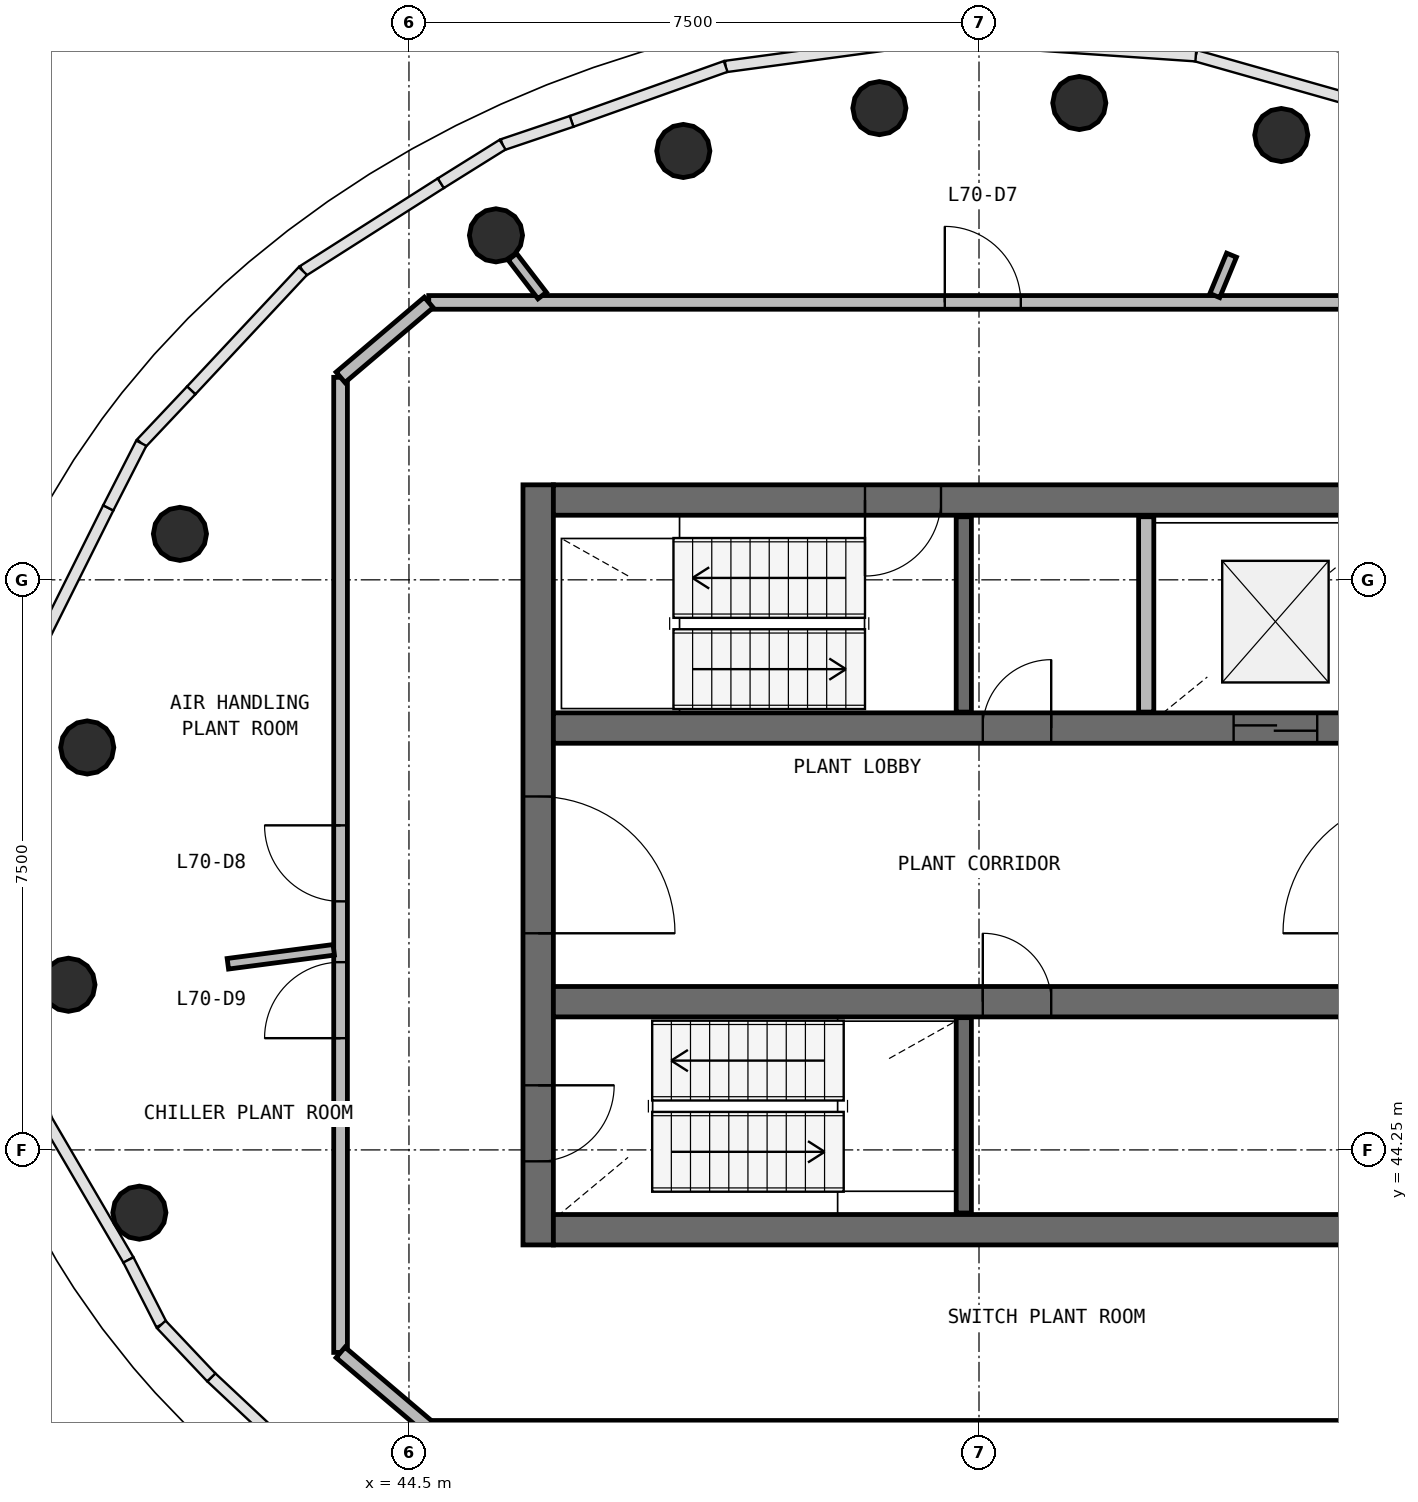
"""IFC4 building model, lengths in metres.
Left out: names, types, materials, properties, quantities, classifications, styles, units other than length and angle.
Written with IfcOpenShell. Run it as: python <this file> out.ifc"""

import sys

from ifc_helpers import new_model, si_unit, direction, frame, frame_2d, origin, origin_2d, place, context, subcontext, project, spatial, rectangle, circle, extrude, source, transform, mapped, element, fill, save


model = new_model("IFC4")
c1 = context("Model", 3, precision=1e-05, world=origin(), true_north=direction((0.0, 1.0)))
c2 = subcontext(c1, "Body", "Model", "MODEL_VIEW")
j1 = project(units=[si_unit("LENGTHUNIT", "METRE"), si_unit("PLANEANGLEUNIT", "RADIAN")], contexts=[c1])
p1 = place(None, origin())
s1 = spatial("IfcSite", under=j1, at=p1, CompositionType="ELEMENT")
p2 = place(p1, origin())
s2 = spatial("IfcBuilding", under=s1, at=p2, CompositionType="ELEMENT")
p3 = place(p2, frame((0.0, 0.0, 283.6)))
s3 = spatial("IfcBuildingStorey", under=s2, at=p3, CompositionType="ELEMENT", Elevation=283.6)
p4 = place(p3, frame((46.2, 53.0, 0.0), z_axis=(0.0, 0.0, 1.0), x_axis=(0.0, -1.0, 0.0)))
e1 = element("IfcWall", 1, at=p4, inside=s3, PredefinedType="SHEAR", context=c2, shape_type="SweptSolid", body=[
    extrude(rectangle(XDim=10.0, YDim=0.4, at=frame_2d((5.0, 0.0))), origin(), (0.0, 0.0, 1.0), 3.5),
])
p5 = place(p4, frame((4.1, 0.0, 0.0)))
e2 = element("IfcOpeningElement", 2, at=p5, cuts=e1, PredefinedType="OPENING", context=c2, shape_type="SweptSolid", body=[
    extrude(rectangle(XDim=1.8, YDim=2.1, at=frame_2d((0.9, 1.05))), frame((0.0, 0.21, 0.0), z_axis=(0.0, -1.0, 0.0), x_axis=(1.0, 0.0, 0.0)), (0.0, 0.0, 1.0), 0.42),
])
p6 = place(p4, frame((7.9, 0.0, 0.0)))
e3 = element("IfcOpeningElement", 3, at=p6, cuts=e1, PredefinedType="OPENING", context=c2, shape_type="SweptSolid", body=[
    extrude(rectangle(XDim=1.0, YDim=2.1, at=frame_2d((0.5, 1.05))), frame((0.0, 0.21, 0.0), z_axis=(0.0, -1.0, 0.0), x_axis=(1.0, 0.0, 0.0)), (0.0, 0.0, 1.0), 0.42),
])
p7 = place(p3, frame((46.4, 43.2, 0.0), z_axis=(0.0, 0.0, 1.0), x_axis=(1.0, 0.0, 0.0)))
e4 = element("IfcWall", 4, at=p7, inside=s3, PredefinedType="SHEAR", context=c2, shape_type="SweptSolid", body=[
    extrude(rectangle(XDim=11.2, YDim=0.4, at=frame_2d((5.6, 0.0))), origin(), (0.0, 0.0, 1.0), 3.5),
])
p8 = place(p3, frame((57.6, 52.8, 0.0), z_axis=(0.0, 0.0, 1.0), x_axis=(-1.0, 0.0, 0.0)))
e5 = element("IfcWall", 5, at=p8, inside=s3, PredefinedType="SHEAR", context=c2, shape_type="SweptSolid", body=[
    extrude(rectangle(XDim=11.2, YDim=0.4, at=frame_2d((5.6, 0.0))), origin(), (0.0, 0.0, 1.0), 3.5),
])
p9 = place(p8, frame((6.1, 0.0, 0.0)))
e6 = element("IfcOpeningElement", 6, at=p9, cuts=e5, PredefinedType="OPENING", context=c2, shape_type="SweptSolid", body=[
    extrude(rectangle(XDim=1.0, YDim=2.1, at=frame_2d((0.5, 1.05))), frame((0.0, 0.21, 0.0), z_axis=(0.0, -1.0, 0.0), x_axis=(1.0, 0.0, 0.0)), (0.0, 0.0, 1.0), 0.42),
])
p10 = place(p3, frame((46.4, 49.8, 0.0), z_axis=(0.0, 0.0, 1.0), x_axis=(1.0, 0.0, 0.0)))
e7 = element("IfcWall", 7, at=p10, inside=s3, PredefinedType="SHEAR", context=c2, shape_type="SweptSolid", body=[
    extrude(rectangle(XDim=11.2, YDim=0.4, at=frame_2d((5.6, 0.0))), origin(), (0.0, 0.0, 1.0), 3.5),
])
p11 = place(p10, frame((8.95, 0.0, 0.0)))
e8 = element("IfcOpeningElement", 8, at=p11, cuts=e7, PredefinedType="OPENING", context=c2, shape_type="SweptSolid", body=[
    extrude(rectangle(XDim=1.1, YDim=2.1, at=frame_2d((0.55, 1.05))), frame((0.0, 0.21, 0.0), z_axis=(0.0, -1.0, 0.0), x_axis=(1.0, 0.0, 0.0)), (0.0, 0.0, 1.0), 0.42),
])
p12 = place(p10, frame((5.65, 0.0, 0.0)))
e9 = element("IfcOpeningElement", 9, at=p12, cuts=e7, PredefinedType="OPENING", context=c2, shape_type="SweptSolid", body=[
    extrude(rectangle(XDim=0.9, YDim=2.1, at=frame_2d((0.45, 1.05))), frame((0.0, 0.21, 0.0), z_axis=(0.0, -1.0, 0.0), x_axis=(1.0, 0.0, 0.0)), (0.0, 0.0, 1.0), 0.42),
])
p13 = place(p3, frame((46.4, 46.2, 0.0), z_axis=(0.0, 0.0, 1.0), x_axis=(1.0, 0.0, 0.0)))
e10 = element("IfcWall", 10, at=p13, inside=s3, PredefinedType="SHEAR", context=c2, shape_type="SweptSolid", body=[
    extrude(rectangle(XDim=11.2, YDim=0.4, at=frame_2d((5.6, 0.0))), origin(), (0.0, 0.0, 1.0), 3.5),
])
p14 = place(p13, frame((5.65, 0.0, 0.0)))
e11 = element("IfcOpeningElement", 11, at=p14, cuts=e10, PredefinedType="OPENING", context=c2, shape_type="SweptSolid", body=[
    extrude(rectangle(XDim=0.9, YDim=2.1, at=frame_2d((0.45, 1.05))), frame((0.0, 0.21, 0.0), z_axis=(0.0, -1.0, 0.0), x_axis=(1.0, 0.0, 0.0)), (0.0, 0.0, 1.0), 0.42),
])
m1 = source(origin(), c2, "Body", "SweptSolid", [
    extrude(circle(Radius=0.35, at=origin_2d()), origin(), (0.0, 0.0, 1.0), 3.833),
])
p15 = place(p3, frame((55.977, 57.602, 0.146), z_axis=(-0.156153714732, -0.376946915782, 0.912977020553), x_axis=(0.923864636245, -0.382719393153, 0.0)))
e12 = element("IfcColumn", 12, at=p15, inside=s3, PredefinedType="COLUMN", context=c2, shape_type="MappedRepresentation", body=[
    mapped(m1, transform((0.0, 0.0, 0.0), scale=1.0)),
])
m2 = source(origin(), c2, "Body", "SweptSolid", [
    extrude(circle(Radius=0.35, at=origin_2d()), origin(), (0.0, 0.0, 1.0), 3.784),
])
p16 = place(p3, frame((53.32, 58.023, 0.136), z_axis=(-0.049674543277, -0.377074942147, 0.924849678464), x_axis=(0.99143407694, -0.130608081992, 0.0)))
e13 = element("IfcColumn", 13, at=p16, inside=s3, PredefinedType="COLUMN", context=c2, shape_type="MappedRepresentation", body=[
    mapped(m2, transform((0.0, 0.0, 0.0), scale=1.0)),
])
m3 = source(origin(), c2, "Body", "SweptSolid", [
    extrude(circle(Radius=0.35, at=origin_2d()), origin(), (0.0, 0.0, 1.0), 3.759),
])
p17 = place(p3, frame((50.689, 57.956, 0.131), z_axis=(0.047669920911, -0.361745857591, 0.931057201871), x_axis=(0.991428831601, 0.13064789271, 0.0)))
e14 = element("IfcColumn", 14, at=p17, inside=s3, PredefinedType="COLUMN", context=c2, shape_type="MappedRepresentation", body=[
    mapped(m3, transform((0.0, 0.0, 0.0), scale=1.0)),
])
m4 = source(origin(), c2, "Body", "SweptSolid", [
    extrude(circle(Radius=0.35, at=origin_2d()), origin(), (0.0, 0.0, 1.0), 3.747),
])
p18 = place(p3, frame((48.11, 57.392, 0.128), z_axis=(0.136577604612, -0.329715018769, 0.934149112464), x_axis=(0.923874408562, 0.38269580244, 0.0)))
e15 = element("IfcColumn", 15, at=p18, inside=s3, PredefinedType="COLUMN", context=c2, shape_type="MappedRepresentation", body=[
    mapped(m4, transform((0.0, 0.0, 0.0), scale=1.0)),
])
m5 = source(origin(), c2, "Body", "SweptSolid", [
    extrude(circle(Radius=0.35, at=origin_2d()), origin(), (0.0, 0.0, 1.0), 3.739),
])
p19 = place(p3, frame((45.645, 56.282, 0.126), z_axis=(0.213995199353, -0.278905552773, 0.936171857773), x_axis=(0.793376088289, 0.608731782094, 0.0)))
e16 = element("IfcColumn", 16, at=p19, inside=s3, PredefinedType="COLUMN", context=c2, shape_type="MappedRepresentation", body=[
    mapped(m5, transform((0.0, 0.0, 0.0), scale=1.0)),
])
m6 = source(origin(), c2, "Body", "SweptSolid", [
    extrude(circle(Radius=0.35, at=origin_2d()), origin(), (0.0, 0.0, 1.0), 3.807),
])
p20 = place(p3, frame((41.487, 52.355, 0.141), z_axis=(0.363645996148, -0.150626775693, 0.919278610613), x_axis=(0.382682721486, 0.923879826967, 0.0)))
e17 = element("IfcColumn", 17, at=p20, inside=s3, PredefinedType="COLUMN", context=c2, shape_type="MappedRepresentation", body=[
    mapped(m6, transform((0.0, 0.0, 0.0), scale=1.0)),
])
m7 = source(origin(), c2, "Body", "SweptSolid", [
    extrude(circle(Radius=0.35, at=origin_2d()), origin(), (0.0, 0.0, 1.0), 3.898),
])
p21 = place(p3, frame((40.267, 49.545, 0.157), z_axis=(0.436576513493, -0.057492072785, 0.897828273911), x_axis=(0.13056120367, 0.9914402514, 0.0)))
e18 = element("IfcColumn", 18, at=p21, inside=s3, PredefinedType="COLUMN", context=c2, shape_type="MappedRepresentation", body=[
    mapped(m7, transform((0.0, 0.0, 0.0), scale=1.0)),
])
m8 = source(origin(), c2, "Body", "SweptSolid", [
    extrude(circle(Radius=0.35, at=origin_2d()), origin(), (0.0, 0.0, 1.0), 4.014),
])
p22 = place(p3, frame((40.02, 46.423, 0.174), z_axis=(0.485558404991, 0.063918071599, 0.871864390525), x_axis=(-0.130512333023, 0.991446685873, 0.0)))
e19 = element("IfcColumn", 19, at=p22, inside=s3, PredefinedType="COLUMN", context=c2, shape_type="MappedRepresentation", body=[
    mapped(m8, transform((0.0, 0.0, 0.0), scale=1.0)),
])
m9 = source(origin(), c2, "Body", "SweptSolid", [
    extrude(circle(Radius=0.35, at=origin_2d()), origin(), (0.0, 0.0, 1.0), 4.07),
])
p23 = place(p3, frame((40.953, 43.424, 0.181), z_axis=(0.471365631204, 0.195217483001, 0.86006079788), x_axis=(-0.382635660379, 0.923899318869, 0.0)))
e20 = element("IfcColumn", 20, at=p23, inside=s3, PredefinedType="COLUMN", context=c2, shape_type="MappedRepresentation", body=[
    mapped(m9, transform((0.0, 0.0, 0.0), scale=1.0)),
])
m10 = source(origin(), c2, "Body", "SweptSolid", [
    extrude(circle(Radius=0.35, at=origin_2d()), origin(), (0.0, 0.0, 1.0), 3.908),
])
p24 = place(p3, frame((45.387, 39.381, 0.159), z_axis=(0.270755010199, 0.352968575825, 0.89560309788), x_axis=(-0.793448113602, 0.608637898115, 0.0)))
e21 = element("IfcColumn", 21, at=p24, inside=s3, PredefinedType="COLUMN", context=c2, shape_type="MappedRepresentation", body=[
    mapped(m10, transform((0.0, 0.0, 0.0), scale=1.0)),
])
for number, where, z_axis, x_axis in (
    (22, (51.8, 43.42, 0.0), (0.0, 0.0, 1.0), (0.0, 1.0, 0.0)),
    (23, (51.8, 50.01, 0.0), (0.0, 0.0, 1.0), (0.0, 1.0, 0.0)),
    (24, (54.2, 52.58, 0.0), (0.0, 0.0, 1.0), (0.0, -1.0, 0.0)),
):
    element("IfcWall", number, at=place(p3, frame(where, z_axis=z_axis, x_axis=x_axis)), inside=s3, PredefinedType="SOLIDWALL", context=c2, shape_type="SweptSolid", body=[
        extrude(rectangle(XDim=2.57, YDim=0.2, at=frame_2d((1.285, 0.0))), origin(), (0.0, 0.0, 1.0), 3.22),
    ])
p25 = place(p3, frame((44.76, 55.4, 0.0), z_axis=(0.0, 0.0, 1.0), x_axis=(1.0, 0.0, 0.0)))
e25 = element("IfcWall", 25, at=p25, inside=s3, PredefinedType="PARTITIONING", context=c2, shape_type="SweptSolid", body=[
    extrude(rectangle(XDim=14.479, YDim=0.18, at=frame_2d((7.24, 0.0))), origin(), (0.0, 0.0, 1.0), 2.62),
])
p26 = place(p25, frame((6.79, 0.0, 0.0)))
e26 = element("IfcOpeningElement", 26, at=p26, cuts=e25, PredefinedType="OPENING", context=c2, shape_type="SweptSolid", body=[
    extrude(rectangle(XDim=1.0, YDim=2.1, at=frame_2d((0.5, 1.05))), frame((0.0, 0.1, 0.0), z_axis=(0.0, -1.0, 0.0), x_axis=(1.0, 0.0, 0.0)), (0.0, 0.0, 1.0), 0.2),
])
p27 = place(p3, frame((59.24, 40.6, 0.0), z_axis=(0.0, 0.0, 1.0), x_axis=(-1.0, 0.0, 0.0)))
e27 = element("IfcWall", 27, at=p27, inside=s3, PredefinedType="PARTITIONING", context=c2, shape_type="SweptSolid", body=[
    extrude(rectangle(XDim=14.479, YDim=0.18, at=frame_2d((7.24, 0.0))), origin(), (0.0, 0.0, 1.0), 2.62),
])
p28 = place(p27, frame((6.79, 0.0, 0.0)))
e28 = element("IfcOpeningElement", 28, at=p28, cuts=e27, PredefinedType="OPENING", context=c2, shape_type="SweptSolid", body=[
    extrude(rectangle(XDim=1.0, YDim=2.1, at=frame_2d((0.5, 1.05))), frame((0.0, 0.1, 0.0), z_axis=(0.0, -1.0, 0.0), x_axis=(1.0, 0.0, 0.0)), (0.0, 0.0, 1.0), 0.2),
])
p29 = place(p3, frame((43.6, 41.586, 0.0), z_axis=(0.0, 0.0, 1.0), x_axis=(0.0, 1.0, 0.0)))
e29 = element("IfcWall", 29, at=p29, inside=s3, PredefinedType="PARTITIONING", context=c2, shape_type="SweptSolid", body=[
    extrude(rectangle(XDim=12.829, YDim=0.18, at=frame_2d((6.414, 0.0))), origin(), (0.0, 0.0, 1.0), 2.62),
])
p30 = place(p29, frame((5.934, 0.0, 0.0)))
e30 = element("IfcOpeningElement", 30, at=p30, cuts=e29, PredefinedType="OPENING", context=c2, shape_type="SweptSolid", body=[
    extrude(rectangle(XDim=1.0, YDim=2.1, at=frame_2d((0.5, 1.05))), frame((0.0, 0.1, 0.0), z_axis=(0.0, -1.0, 0.0), x_axis=(1.0, 0.0, 0.0)), (0.0, 0.0, 1.0), 0.2),
])
p31 = place(p29, frame((4.134, 0.0, 0.0)))
e31 = element("IfcOpeningElement", 31, at=p31, cuts=e29, PredefinedType="OPENING", context=c2, shape_type="SweptSolid", body=[
    extrude(rectangle(XDim=1.0, YDim=2.1, at=frame_2d((0.5, 1.05))), frame((0.0, 0.1, 0.0), z_axis=(0.0, -1.0, 0.0), x_axis=(1.0, 0.0, 0.0)), (0.0, 0.0, 1.0), 0.2),
])
p32 = place(p3, frame((43.51, 46.882, 0.0), z_axis=(0.0, 0.0, 1.0), x_axis=(-0.991446604194, -0.130512953506, 0.0)))
e32 = element("IfcWall", 32, at=p32, inside=s3, PredefinedType="PARTITIONING", context=c2, shape_type="SweptSolid", body=[
    extrude(rectangle(XDim=1.405, YDim=0.14, at=frame_2d((0.702, 0.0))), origin(), (0.0, 0.0, 1.0), 2.62),
])
p33 = place(p3, frame((55.103, 55.49, 0.0), z_axis=(0.0, 0.0, 1.0), x_axis=(0.382564297979, 0.923928870591, 0.0)))
e33 = element("IfcWall", 33, at=p33, inside=s3, PredefinedType="PARTITIONING", context=c2, shape_type="SweptSolid", body=[
    extrude(rectangle(XDim=0.575, YDim=0.14, at=frame_2d((0.288, 0.0))), origin(), (0.0, 0.0, 1.0), 2.62),
])
p34 = place(p3, frame((46.253, 55.49, 0.0), z_axis=(0.0, 0.0, 1.0), x_axis=(-0.608757758263, 0.79335615694, 0.0)))
e34 = element("IfcWall", 34, at=p34, inside=s3, PredefinedType="PARTITIONING", context=c2, shape_type="SweptSolid", body=[
    extrude(rectangle(XDim=0.644, YDim=0.14, at=frame_2d((0.322, 0.0))), origin(), (0.0, 0.0, 1.0), 2.62),
])
for number, where, z_axis, x_axis in (
    (35, (44.76, 55.4, 0.0), (0.0, 0.0, 1.0), (-0.762, -0.647, 0.0)),
    (36, (44.76, 40.6, 0.0), (0.0, 0.0, 1.0), (-0.762, 0.647, 0.0)),
):
    element("IfcWall", number, at=place(p3, frame(where, z_axis=z_axis, x_axis=x_axis)), inside=s3, PredefinedType="PARTITIONING", context=c2, shape_type="SweptSolid", body=[
        extrude(rectangle(XDim=1.522, YDim=0.18, at=frame_2d((0.761, 0.0))), origin(), (0.0, 0.0, 1.0), 2.62),
    ])
m11 = source(origin(), c2, "Body", "SweptSolid", [
    extrude(rectangle(XDim=1.8, YDim=2.1, at=frame_2d((0.9, 1.05))), frame((0.0, 0.025, 0.0), z_axis=(0.0, -1.0, 0.0), x_axis=(1.0, 0.0, 0.0)), (0.0, 0.0, 1.0), 0.05),
])
p35 = place(p5, origin())
e37 = element("IfcDoor", 37, at=p35, inside=s3, OperationType="SINGLE_SWING_RIGHT", PredefinedType="DOOR", context=c2, shape_type="MappedRepresentation", body=[
    mapped(m11, transform((0.0, 0.0, 0.0), scale=1.0)),
])
fill(e2, e37)
m12 = source(origin(), c2, "Body", "SweptSolid", [
    extrude(rectangle(XDim=1.0, YDim=2.1, at=frame_2d((0.5, 1.05))), frame((0.0, 0.025, 0.0), z_axis=(0.0, -1.0, 0.0), x_axis=(1.0, 0.0, 0.0)), (0.0, 0.0, 1.0), 0.05),
])
p36 = place(p9, origin())
e38 = element("IfcDoor", 38, at=p36, inside=s3, OperationType="SINGLE_SWING_RIGHT", PredefinedType="DOOR", context=c2, shape_type="MappedRepresentation", body=[
    mapped(m12, transform((0.0, 0.0, 0.0), scale=1.0)),
])
fill(e6, e38)
p37 = place(p6, origin())
e39 = element("IfcDoor", 39, at=p37, inside=s3, OperationType="SINGLE_SWING_LEFT", PredefinedType="DOOR", context=c2, shape_type="MappedRepresentation", body=[
    mapped(m12, transform((0.0, 0.0, 0.0), scale=1.0)),
])
fill(e3, e39)
m13 = source(origin(), c2, "Body", "SweptSolid", [
    extrude(rectangle(XDim=1.1, YDim=2.1, at=frame_2d((0.55, 1.05))), frame((0.0, 0.025, 0.0), z_axis=(0.0, -1.0, 0.0), x_axis=(1.0, 0.0, 0.0)), (0.0, 0.0, 1.0), 0.05),
])
p38 = place(p11, origin())
e40 = element("IfcDoor", 40, at=p38, inside=s3, OperationType="DOUBLE_DOOR_SLIDING", PredefinedType="USERDEFINED", context=c2, shape_type="MappedRepresentation", body=[
    mapped(m13, transform((0.0, 0.0, 0.0), scale=1.0)),
])
fill(e8, e40)
m14 = source(origin(), c2, "Body", "SweptSolid", [
    extrude(rectangle(XDim=1.0, YDim=2.1, at=frame_2d((0.5, 1.05))), frame((0.0, 0.025, 0.0), z_axis=(0.0, -1.0, 0.0), x_axis=(1.0, 0.0, 0.0)), (0.0, 0.0, 1.0), 0.05),
])
p39 = place(p26, origin())
e41 = element("IfcDoor", 41, at=p39, inside=s3, OperationType="SINGLE_SWING_LEFT", PredefinedType="DOOR", context=c2, shape_type="MappedRepresentation", body=[
    mapped(m14, transform((0.0, 0.0, 0.0), scale=1.0)),
])
fill(e26, e41)
p40 = place(p30, origin())
e42 = element("IfcDoor", 42, at=p40, inside=s3, OperationType="SINGLE_SWING_RIGHT", PredefinedType="DOOR", context=c2, shape_type="MappedRepresentation", body=[
    mapped(m14, transform((0.0, 0.0, 0.0), scale=1.0)),
])
fill(e30, e42)
p41 = place(p31, origin())
e43 = element("IfcDoor", 43, at=p41, inside=s3, OperationType="SINGLE_SWING_LEFT", PredefinedType="DOOR", context=c2, shape_type="MappedRepresentation", body=[
    mapped(m14, transform((0.0, 0.0, 0.0), scale=1.0)),
])
fill(e31, e43)
m15 = source(origin(), c2, "Body", "SweptSolid", [
    extrude(rectangle(XDim=0.9, YDim=2.1, at=frame_2d((0.45, 1.05))), frame((0.0, 0.025, 0.0), z_axis=(0.0, -1.0, 0.0), x_axis=(1.0, 0.0, 0.0)), (0.0, 0.0, 1.0), 0.05),
])
p42 = place(p12, origin())
e44 = element("IfcDoor", 44, at=p42, inside=s3, OperationType="SINGLE_SWING_RIGHT", PredefinedType="DOOR", context=c2, shape_type="MappedRepresentation", body=[
    mapped(m15, transform((0.0, 0.0, 0.0), scale=1.0)),
])
fill(e9, e44)
p43 = place(p14, origin())
e45 = element("IfcDoor", 45, at=p43, inside=s3, OperationType="SINGLE_SWING_LEFT", PredefinedType="DOOR", context=c2, shape_type="MappedRepresentation", body=[
    mapped(m15, transform((0.0, 0.0, 0.0), scale=1.0)),
])
fill(e11, e45)
save(model, sys.argv[1])
